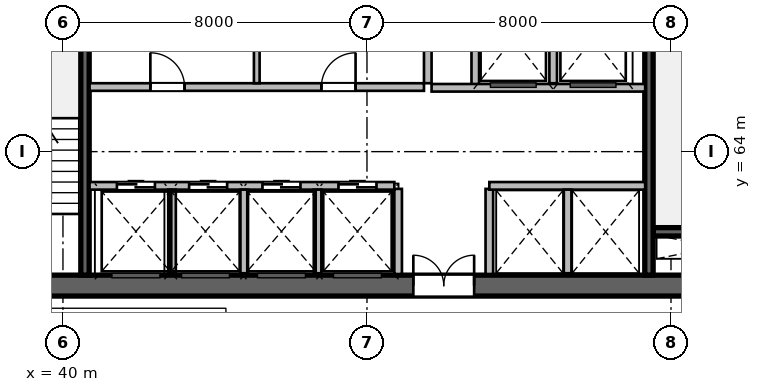
"""IFC4 building model, lengths in metres.
Left out: names, types, materials, properties, quantities, classifications, styles, units other than length and angle.
Written with IfcOpenShell. Run it as: python <this file> out.ifc"""

import sys

from ifc_helpers import new_model, si_unit, direction, frame, frame_2d, origin, place, context, subcontext, project, spatial, rectangle, extrude, source, transform, mapped, element, fill, save


model = new_model("IFC4")
c1 = context("Model", 3, precision=1e-05, world=origin(), true_north=direction((0.0, 1.0)))
c2 = subcontext(c1, "Body", "Model", "MODEL_VIEW")
j1 = project(units=[si_unit("LENGTHUNIT", "METRE"), si_unit("PLANEANGLEUNIT", "RADIAN")], contexts=[c1])
p1 = place(None, origin())
s1 = spatial("IfcSite", under=j1, at=p1, CompositionType="ELEMENT")
p2 = place(p1, origin())
s2 = spatial("IfcBuilding", under=s1, at=p2, CompositionType="ELEMENT")
p3 = place(p2, frame((0.0, 0.0, 46.2)))
s3 = spatial("IfcBuildingStorey", under=s2, at=p3, CompositionType="ELEMENT", Elevation=46.2)
m1 = source(origin(), c2, "Body", "SweptSolid", [
    extrude(rectangle(XDim=21.6, YDim=0.55, at=frame_2d((10.8, 0.0))), origin(), (0.0, 0.0, 1.0), 3.6),
])
p4 = place(p3, frame((37.2, 60.475, 0.0), z_axis=(0.0, 0.0, 1.0), x_axis=(1.0, 0.0, 0.0)))
e1 = element("IfcWall", 1, at=p4, inside=s3, PredefinedType="SHEAR", context=c2, shape_type="MappedRepresentation", body=[
    mapped(m1, transform((0.0, 0.0, 0.0), scale=1.0)),
])
p5 = place(p4, frame((1.1, 0.0, 0.0)))
e2 = element("IfcOpeningElement", 2, at=p5, cuts=e1, PredefinedType="OPENING", context=c2, shape_type="SweptSolid", body=[
    extrude(rectangle(XDim=1.15, YDim=2.15, at=frame_2d((0.575, 1.075))), frame((0.0, 0.285, 0.0), z_axis=(0.0, -1.0, 0.0), x_axis=(1.0, 0.0, 0.0)), (0.0, 0.0, 1.0), 0.57),
])
p6 = place(p4, frame((19.5, 0.0, 0.0)))
e3 = element("IfcOpeningElement", 3, at=p6, cuts=e1, PredefinedType="OPENING", context=c2, shape_type="SweptSolid", body=[
    extrude(rectangle(XDim=0.9, YDim=2.1, at=frame_2d((0.45, 1.05))), frame((0.0, 0.285, 0.0), z_axis=(0.0, -1.0, 0.0), x_axis=(1.0, 0.0, 0.0)), (0.0, 0.0, 1.0), 0.57),
])
p7 = place(p4, frame((12.02, 0.0, 0.0)))
e4 = element("IfcOpeningElement", 4, at=p7, cuts=e1, PredefinedType="OPENING", context=c2, shape_type="SweptSolid", body=[
    extrude(rectangle(XDim=1.6, YDim=2.15, at=frame_2d((0.8, 1.075))), frame((0.0, 0.285, 0.0), z_axis=(0.0, -1.0, 0.0), x_axis=(1.0, 0.0, 0.0)), (0.0, 0.0, 1.0), 0.57),
])
m2 = source(origin(), c2, "Body", "SweptSolid", [
    extrude(rectangle(XDim=3.27, YDim=0.22, at=frame_2d((1.635, 0.0))), origin(), (0.0, 0.0, 1.0), 3.6),
])
p8 = place(p3, frame((55.53, 61.89, 0.0), z_axis=(0.0, 0.0, 1.0), x_axis=(1.0, 0.0, 0.0)))
e5 = element("IfcWall", 5, at=p8, inside=s3, PredefinedType="SHEAR", context=c2, shape_type="MappedRepresentation", body=[
    mapped(m2, transform((0.0, 0.0, 0.0), scale=1.0)),
])
m3 = source(origin(), c2, "Body", "SweptSolid", [
    extrude(rectangle(XDim=10.9, YDim=0.22, at=frame_2d((5.45, 0.0))), origin(), (0.0, 0.0, 1.0), 3.6),
])
p9 = place(p3, frame((40.58, 60.75, 0.0), z_axis=(0.0, 0.0, 1.0), x_axis=(0.0, 1.0, 0.0)))
e6 = element("IfcWall", 6, at=p9, inside=s3, PredefinedType="SHEAR", context=c2, shape_type="MappedRepresentation", body=[
    mapped(m3, transform((0.0, 0.0, 0.0), scale=1.0)),
])
p10 = place(p3, frame((55.42, 60.75, 0.0), z_axis=(0.0, 0.0, 1.0), x_axis=(0.0, 1.0, 0.0)))
e7 = element("IfcWall", 7, at=p10, inside=s3, PredefinedType="SHEAR", context=c2, shape_type="MappedRepresentation", body=[
    mapped(m3, transform((0.0, 0.0, 0.0), scale=1.0)),
])
p11 = place(p10, frame((9.495, 0.0, 0.0)))
e8 = element("IfcOpeningElement", 8, at=p11, cuts=e7, PredefinedType="OPENING", context=c2, shape_type="SweptSolid", body=[
    extrude(rectangle(XDim=1.15, YDim=2.15, at=frame_2d((0.575, 1.075))), frame((0.0, 0.12, 0.0), z_axis=(0.0, -1.0, 0.0), x_axis=(1.0, 0.0, 0.0)), (0.0, 0.0, 1.0), 0.24),
])
m4 = source(origin(), c2, "Body", "SweptSolid", [
    extrude(rectangle(XDim=2.24, YDim=0.2, at=frame_2d((1.12, 0.0))), origin(), (0.0, 0.0, 1.0), 3.36),
])
for number, where, z_axis, x_axis in (
    (9, (48.82, 60.78, 0.0), (0.0, 0.0, 1.0), (0.0, 1.0, 0.0)),
    (10, (51.22, 60.78, 0.0), (0.0, 0.0, 1.0), (0.0, 1.0, 0.0)),
):
    element("IfcWall", number, at=place(p3, frame(where, z_axis=z_axis, x_axis=x_axis)), inside=s3, PredefinedType="SOLIDWALL", context=c2, shape_type="MappedRepresentation", body=[
        mapped(m4, transform((0.0, 0.0, 0.0), scale=1.0)),
    ])
m5 = source(origin(), c2, "Body", "SweptSolid", [
    extrude(rectangle(XDim=5.8, YDim=0.2, at=frame_2d((2.9, 0.0))), origin(), (0.0, 0.0, 1.0), 3.36),
])
p12 = place(p3, frame((49.6, 65.8, 0.0), z_axis=(0.0, 0.0, 1.0), x_axis=(0.0, 1.0, 0.0)))
e11 = element("IfcWall", 11, at=p12, inside=s3, PredefinedType="SOLIDWALL", context=c2, shape_type="MappedRepresentation", body=[
    mapped(m5, transform((0.0, 0.0, 0.0), scale=1.0)),
])
m6 = source(origin(), c2, "Body", "SweptSolid", [
    extrude(rectangle(XDim=2.58, YDim=0.2, at=frame_2d((1.29, 0.0))), origin(), (0.0, 0.0, 1.0), 3.36),
])
p13 = place(p3, frame((50.85, 65.68, 0.0), z_axis=(0.0, 0.0, 1.0), x_axis=(0.0, 1.0, 0.0)))
e12 = element("IfcWall", 12, at=p13, inside=s3, PredefinedType="SOLIDWALL", context=c2, shape_type="MappedRepresentation", body=[
    mapped(m6, transform((0.0, 0.0, 0.0), scale=1.0)),
])
m7 = source(origin(), c2, "Body", "SweptSolid", [
    extrude(rectangle(XDim=2.4, YDim=0.2, at=frame_2d((1.2, 0.0))), origin(), (0.0, 0.0, 1.0), 3.36),
])
p14 = place(p3, frame((52.9, 65.8, 0.0), z_axis=(0.0, 0.0, 1.0), x_axis=(0.0, 1.0, 0.0)))
e13 = element("IfcWall", 13, at=p14, inside=s3, PredefinedType="SOLIDWALL", context=c2, shape_type="MappedRepresentation", body=[
    mapped(m7, transform((0.0, 0.0, 0.0), scale=1.0)),
])
m8 = source(origin(), c2, "Body", "SweptSolid", [
    extrude(rectangle(XDim=5.62, YDim=0.2, at=frame_2d((2.81, 0.0))), origin(), (0.0, 0.0, 1.0), 3.36),
])
p15 = place(p3, frame((49.7, 65.68, 0.0), z_axis=(0.0, 0.0, 1.0), x_axis=(1.0, 0.0, 0.0)))
e14 = element("IfcWall", 14, at=p15, inside=s3, PredefinedType="SOLIDWALL", context=c2, shape_type="MappedRepresentation", body=[
    mapped(m8, transform((0.0, 0.0, 0.0), scale=1.0)),
])
m9 = source(origin(), c2, "Body", "SweptSolid", [
    extrude(rectangle(XDim=8.02, YDim=0.2, at=frame_2d((4.01, 0.0))), origin(), (0.0, 0.0, 1.0), 3.36),
])
p16 = place(p3, frame((40.7, 63.1, 0.0), z_axis=(0.0, 0.0, 1.0), x_axis=(1.0, 0.0, 0.0)))
e15 = element("IfcWall", 15, at=p16, inside=s3, PredefinedType="SOLIDWALL", context=c2, shape_type="MappedRepresentation", body=[
    mapped(m9, transform((0.0, 0.0, 0.0), scale=1.0)),
])
p17 = place(p16, frame((0.72, 0.0, 0.0)))
e16 = element("IfcOpeningElement", 16, at=p17, cuts=e15, PredefinedType="OPENING", context=c2, shape_type="SweptSolid", body=[
    extrude(rectangle(XDim=1.0, YDim=2.15, at=frame_2d((0.5, 1.075))), frame((0.0, 0.11, 0.0), z_axis=(0.0, -1.0, 0.0), x_axis=(1.0, 0.0, 0.0)), (0.0, 0.0, 1.0), 0.22),
])
p18 = place(p16, frame((2.62, 0.0, 0.0)))
e17 = element("IfcOpeningElement", 17, at=p18, cuts=e15, PredefinedType="OPENING", context=c2, shape_type="SweptSolid", body=[
    extrude(rectangle(XDim=1.0, YDim=2.15, at=frame_2d((0.5, 1.075))), frame((0.0, 0.11, 0.0), z_axis=(0.0, -1.0, 0.0), x_axis=(1.0, 0.0, 0.0)), (0.0, 0.0, 1.0), 0.22),
])
p19 = place(p16, frame((4.55, 0.0, 0.0)))
e18 = element("IfcOpeningElement", 18, at=p19, cuts=e15, PredefinedType="OPENING", context=c2, shape_type="SweptSolid", body=[
    extrude(rectangle(XDim=1.0, YDim=2.15, at=frame_2d((0.5, 1.075))), frame((0.0, 0.11, 0.0), z_axis=(0.0, -1.0, 0.0), x_axis=(1.0, 0.0, 0.0)), (0.0, 0.0, 1.0), 0.22),
])
p20 = place(p16, frame((6.55, 0.0, 0.0)))
e19 = element("IfcOpeningElement", 19, at=p20, cuts=e15, PredefinedType="OPENING", context=c2, shape_type="SweptSolid", body=[
    extrude(rectangle(XDim=1.0, YDim=2.15, at=frame_2d((0.5, 1.075))), frame((0.0, 0.11, 0.0), z_axis=(0.0, -1.0, 0.0), x_axis=(1.0, 0.0, 0.0)), (0.0, 0.0, 1.0), 0.22),
])
m10 = source(origin(), c2, "Body", "SweptSolid", [
    extrude(rectangle(XDim=4.1, YDim=0.2, at=frame_2d((2.05, 0.0))), origin(), (0.0, 0.0, 1.0), 3.36),
])
p21 = place(p3, frame((51.22, 63.1, 0.0), z_axis=(0.0, 0.0, 1.0), x_axis=(1.0, 0.0, 0.0)))
e20 = element("IfcWall", 20, at=p21, inside=s3, PredefinedType="SOLIDWALL", context=c2, shape_type="MappedRepresentation", body=[
    mapped(m10, transform((0.0, 0.0, 0.0), scale=1.0)),
])
m11 = source(origin(), c2, "Body", "SweptSolid", [
    extrude(rectangle(XDim=2.2, YDim=0.2, at=frame_2d((1.1, 0.0))), origin(), (0.0, 0.0, 1.0), 3.36),
])
for number, where, z_axis, x_axis in (
    (21, (42.87, 60.8, 0.0), (0.0, 0.0, 1.0), (0.0, 1.0, 0.0)),
    (22, (44.77, 60.8, 0.0), (0.0, 0.0, 1.0), (0.0, 1.0, 0.0)),
    (23, (46.7, 60.8, 0.0), (0.0, 0.0, 1.0), (0.0, 1.0, 0.0)),
    (24, (53.28, 60.8, 0.0), (0.0, 0.0, 1.0), (0.0, 1.0, 0.0)),
):
    element("IfcWall", number, at=place(p3, frame(where, z_axis=z_axis, x_axis=x_axis)), inside=s3, PredefinedType="SOLIDWALL", context=c2, shape_type="MappedRepresentation", body=[
        mapped(m11, transform((0.0, 0.0, 0.0), scale=1.0)),
    ])
m12 = source(origin(), c2, "Body", "SweptSolid", [
    extrude(rectangle(XDim=8.8, YDim=0.2, at=frame_2d((4.4, 0.0))), origin(), (0.0, 0.0, 1.0), 3.36),
])
p22 = place(p3, frame((40.7, 65.7, 0.0), z_axis=(0.0, 0.0, 1.0), x_axis=(1.0, 0.0, 0.0)))
e25 = element("IfcWall", 25, at=p22, inside=s3, PredefinedType="SOLIDWALL", context=c2, shape_type="MappedRepresentation", body=[
    mapped(m12, transform((0.0, 0.0, 0.0), scale=1.0)),
])
p23 = place(p22, frame((1.6, 0.0, 0.0)))
e26 = element("IfcOpeningElement", 26, at=p23, cuts=e25, PredefinedType="OPENING", context=c2, shape_type="SweptSolid", body=[
    extrude(rectangle(XDim=0.9, YDim=2.1, at=frame_2d((0.45, 1.05))), frame((0.0, 0.11, 0.0), z_axis=(0.0, -1.0, 0.0), x_axis=(1.0, 0.0, 0.0)), (0.0, 0.0, 1.0), 0.22),
])
p24 = place(p22, frame((6.1, 0.0, 0.0)))
e27 = element("IfcOpeningElement", 27, at=p24, cuts=e25, PredefinedType="OPENING", context=c2, shape_type="SweptSolid", body=[
    extrude(rectangle(XDim=0.9, YDim=2.1, at=frame_2d((0.45, 1.05))), frame((0.0, 0.11, 0.0), z_axis=(0.0, -1.0, 0.0), x_axis=(1.0, 0.0, 0.0)), (0.0, 0.0, 1.0), 0.22),
])
m13 = source(origin(), c2, "Body", "SweptSolid", [
    extrude(rectangle(XDim=2.4, YDim=0.15, at=frame_2d((1.2, 0.0))), origin(), (0.0, 0.0, 1.0), 3.36),
])
p25 = place(p3, frame((45.1, 65.8, 0.0), z_axis=(0.0, 0.0, 1.0), x_axis=(0.0, 1.0, 0.0)))
e28 = element("IfcWall", 28, at=p25, inside=s3, PredefinedType="PARTITIONING", context=c2, shape_type="MappedRepresentation", body=[
    mapped(m13, transform((0.0, 0.0, 0.0), scale=1.0)),
])
m14 = source(origin(), c2, "Body", "SweptSolid", [
    extrude(rectangle(XDim=1.6, YDim=2.15, at=frame_2d((0.8, 1.075))), frame((0.0, 0.025, 0.0), z_axis=(0.0, -1.0, 0.0), x_axis=(1.0, 0.0, 0.0)), (0.0, 0.0, 1.0), 0.05),
])
p26 = place(p7, origin())
e29 = element("IfcDoor", 29, at=p26, inside=s3, OperationType="DOUBLE_DOOR_SINGLE_SWING", PredefinedType="DOOR", context=c2, shape_type="MappedRepresentation", body=[
    mapped(m14, transform((0.0, 0.0, 0.0), scale=1.0)),
])
fill(e4, e29)
m15 = source(origin(), c2, "Body", "SweptSolid", [
    extrude(rectangle(XDim=1.0, YDim=2.15, at=frame_2d((0.5, 1.075))), frame((0.0, 0.025, 0.0), z_axis=(0.0, -1.0, 0.0), x_axis=(1.0, 0.0, 0.0)), (0.0, 0.0, 1.0), 0.05),
])
p27 = place(p17, origin())
e30 = element("IfcDoor", 30, at=p27, inside=s3, OperationType="DOUBLE_DOOR_SLIDING", PredefinedType="DOOR", context=c2, shape_type="MappedRepresentation", body=[
    mapped(m15, transform((0.0, 0.0, 0.0), scale=1.0)),
])
fill(e16, e30)
p28 = place(p18, origin())
e31 = element("IfcDoor", 31, at=p28, inside=s3, OperationType="DOUBLE_DOOR_SLIDING", PredefinedType="DOOR", context=c2, shape_type="MappedRepresentation", body=[
    mapped(m15, transform((0.0, 0.0, 0.0), scale=1.0)),
])
fill(e17, e31)
p29 = place(p19, origin())
e32 = element("IfcDoor", 32, at=p29, inside=s3, OperationType="DOUBLE_DOOR_SLIDING", PredefinedType="DOOR", context=c2, shape_type="MappedRepresentation", body=[
    mapped(m15, transform((0.0, 0.0, 0.0), scale=1.0)),
])
fill(e18, e32)
p30 = place(p20, origin())
e33 = element("IfcDoor", 33, at=p30, inside=s3, OperationType="DOUBLE_DOOR_SLIDING", PredefinedType="DOOR", context=c2, shape_type="MappedRepresentation", body=[
    mapped(m15, transform((0.0, 0.0, 0.0), scale=1.0)),
])
fill(e19, e33)
m16 = source(origin(), c2, "Body", "SweptSolid", [
    extrude(rectangle(XDim=0.9, YDim=2.1, at=frame_2d((0.45, 1.05))), frame((0.0, 0.025, 0.0), z_axis=(0.0, -1.0, 0.0), x_axis=(1.0, 0.0, 0.0)), (0.0, 0.0, 1.0), 0.05),
])
p31 = place(p23, origin())
e34 = element("IfcDoor", 34, at=p31, inside=s3, OperationType="SINGLE_SWING_LEFT", PredefinedType="DOOR", context=c2, shape_type="MappedRepresentation", body=[
    mapped(m16, transform((0.0, 0.0, 0.0), scale=1.0)),
])
fill(e26, e34)
p32 = place(p24, origin())
e35 = element("IfcDoor", 35, at=p32, inside=s3, OperationType="SINGLE_SWING_RIGHT", PredefinedType="DOOR", context=c2, shape_type="MappedRepresentation", body=[
    mapped(m16, transform((0.0, 0.0, 0.0), scale=1.0)),
])
fill(e27, e35)
save(model, sys.argv[1])
